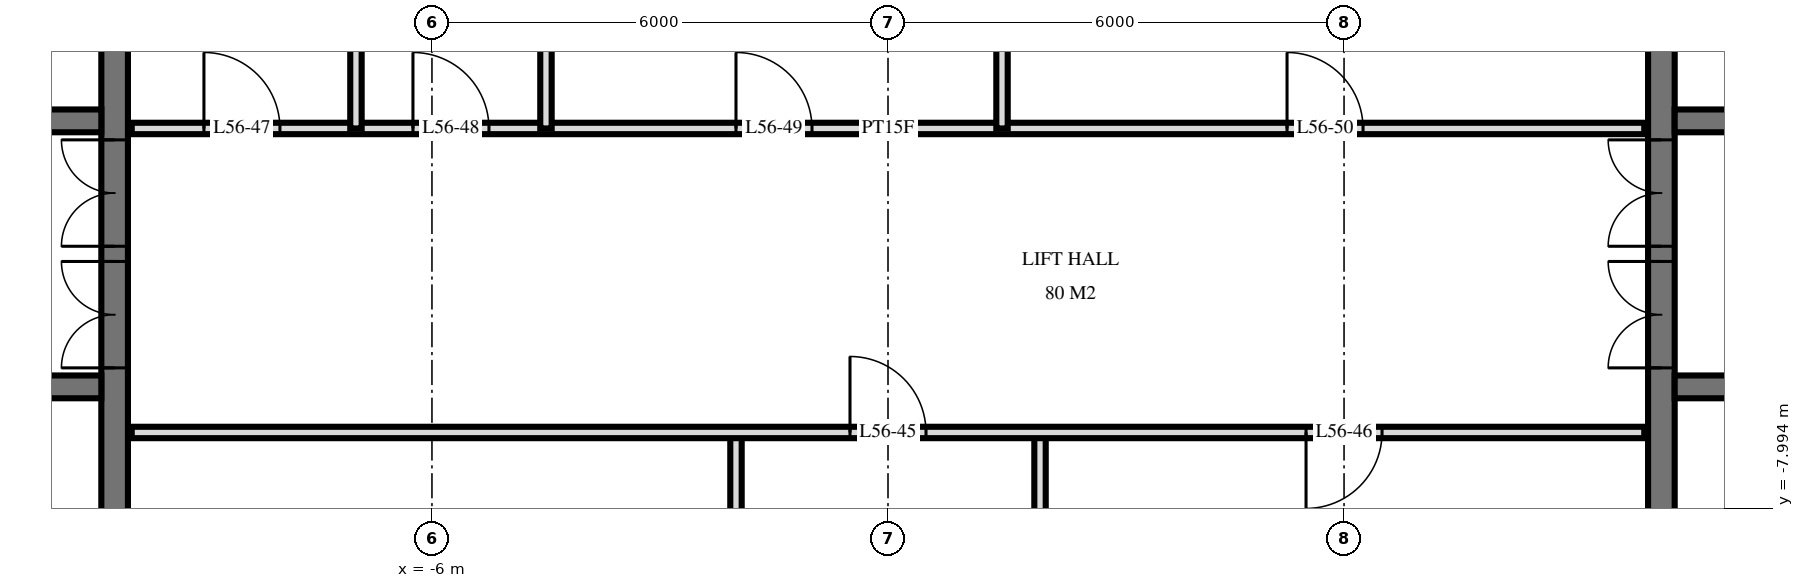
"""IFC4 building model, lengths in metres.
Left out: names, types, materials, properties, quantities, classifications, styles, units other than length and angle.
Written with IfcOpenShell. Run it as: python <this file> out.ifc"""

import sys

from ifc_helpers import new_model, si_unit, direction, frame, frame_2d, origin, place, context, subcontext, project, spatial, rectangle, extrude, element, fill, save


model = new_model("IFC4")
c1 = context("Model", 3, precision=1e-05, world=origin(), true_north=direction((0.0, 1.0)))
c2 = subcontext(c1, "Body", "Model", "MODEL_VIEW")
j1 = project(units=[si_unit("LENGTHUNIT", "METRE"), si_unit("PLANEANGLEUNIT", "RADIAN")], contexts=[c1])
p1 = place(None, origin())
s1 = spatial("IfcSite", under=j1, at=p1, CompositionType="ELEMENT")
p2 = place(p1, origin())
s2 = spatial("IfcBuilding", under=s1, at=p2, CompositionType="ELEMENT")
p3 = place(p2, frame((0.0, 0.0, 215.1)))
s3 = spatial("IfcBuildingStorey", under=s2, at=p3, CompositionType="ELEMENT", Elevation=215.1)
p4 = place(p3, frame((-10.175, -14.55, 0.0), z_axis=(0.0, 0.0, 1.0), x_axis=(0.0, 1.0, 0.0)))
e1 = element("IfcWall", 1, at=p4, inside=s3, PredefinedType="SHEAR", context=c2, shape_type="SweptSolid", body=[
    extrude(rectangle(XDim=14.1, YDim=0.35, at=frame_2d((7.05, 0.0))), origin(), (0.0, 0.0, 1.0), 3.5),
])
p5 = place(p4, frame((8.4, 0.0, 0.0)))
e2 = element("IfcOpeningElement", 2, at=p5, cuts=e1, PredefinedType="OPENING", context=c2, shape_type="SweptSolid", body=[
    extrude(rectangle(XDim=1.4, YDim=2.4, at=frame_2d((0.7, 1.2))), frame((0.0, 0.185, 0.0), z_axis=(0.0, -1.0, 0.0), x_axis=(1.0, 0.0, 0.0)), (0.0, 0.0, 1.0), 0.37),
])
p6 = place(p4, frame((10.0, 0.0, 0.0)))
e3 = element("IfcOpeningElement", 3, at=p6, cuts=e1, PredefinedType="OPENING", context=c2, shape_type="SweptSolid", body=[
    extrude(rectangle(XDim=1.4, YDim=2.4, at=frame_2d((0.7, 1.2))), frame((0.0, 0.185, 0.0), z_axis=(0.0, -1.0, 0.0), x_axis=(1.0, 0.0, 0.0)), (0.0, 0.0, 1.0), 0.37),
])
p7 = place(p4, frame((4.0, 0.0, 0.0)))
e4 = element("IfcOpeningElement", 4, at=p7, cuts=e1, PredefinedType="OPENING", context=c2, shape_type="SweptSolid", body=[
    extrude(rectangle(XDim=1.2, YDim=2.1, at=frame_2d((0.6, 1.05))), frame((0.0, 0.185, 0.0), z_axis=(0.0, -1.0, 0.0), x_axis=(1.0, 0.0, 0.0)), (0.0, 0.0, 1.0), 0.37),
])
p8 = place(p3, frame((-24.05, -2.9, 0.0), z_axis=(0.0, 0.0, 1.0), x_axis=(1.0, 0.0, 0.0)))
e5 = element("IfcWall", 5, at=p8, inside=s3, PredefinedType="SHEAR", context=c2, shape_type="SweptSolid", body=[
    extrude(rectangle(XDim=13.7, YDim=0.3, at=frame_2d((6.85, 0.0))), origin(), (0.0, 0.0, 1.0), 3.5),
])
p9 = place(p8, frame((0.55, 0.0, 0.0)))
e6 = element("IfcOpeningElement", 6, at=p9, cuts=e5, PredefinedType="OPENING", context=c2, shape_type="SweptSolid", body=[
    extrude(rectangle(XDim=1.1, YDim=2.1, at=frame_2d((0.55, 1.05))), frame((0.0, 0.16, 0.0), z_axis=(0.0, -1.0, 0.0), x_axis=(1.0, 0.0, 0.0)), (0.0, 0.0, 1.0), 0.32),
])
p10 = place(p8, frame((6.863, 0.0, 0.0)))
e7 = element("IfcOpeningElement", 7, at=p10, cuts=e5, PredefinedType="OPENING", context=c2, shape_type="SweptSolid", body=[
    extrude(rectangle(XDim=0.9, YDim=2.1, at=frame_2d((0.45, 1.05))), frame((0.0, 0.16, 0.0), z_axis=(0.0, -1.0, 0.0), x_axis=(1.0, 0.0, 0.0)), (0.0, 0.0, 1.0), 0.32),
])
p11 = place(p8, frame((5.438, 0.0, 0.0)))
e8 = element("IfcOpeningElement", 8, at=p11, cuts=e5, PredefinedType="OPENING", context=c2, shape_type="SweptSolid", body=[
    extrude(rectangle(XDim=0.9, YDim=2.1, at=frame_2d((0.45, 1.05))), frame((0.0, 0.16, 0.0), z_axis=(0.0, -1.0, 0.0), x_axis=(1.0, 0.0, 0.0)), (0.0, 0.0, 1.0), 0.32),
])
p12 = place(p8, frame((11.85, 0.0, 0.0)))
e9 = element("IfcOpeningElement", 9, at=p12, cuts=e5, PredefinedType="OPENING", context=c2, shape_type="SweptSolid", body=[
    extrude(rectangle(XDim=1.0, YDim=2.1, at=frame_2d((0.5, 1.05))), frame((0.0, 0.16, 0.0), z_axis=(0.0, -1.0, 0.0), x_axis=(1.0, 0.0, 0.0)), (0.0, 0.0, 1.0), 0.32),
])
p13 = place(p8, frame((9.562, 0.0, 0.0)))
e10 = element("IfcOpeningElement", 10, at=p13, cuts=e5, PredefinedType="OPENING", context=c2, shape_type="SweptSolid", body=[
    extrude(rectangle(XDim=1.0, YDim=2.1, at=frame_2d((0.5, 1.05))), frame((0.0, 0.16, 0.0), z_axis=(0.0, -1.0, 0.0), x_axis=(1.0, 0.0, 0.0)), (0.0, 0.0, 1.0), 0.32),
])
p14 = place(p8, frame((8.137, 0.0, 0.0)))
e11 = element("IfcOpeningElement", 11, at=p14, cuts=e5, PredefinedType="OPENING", context=c2, shape_type="SweptSolid", body=[
    extrude(rectangle(XDim=1.0, YDim=2.1, at=frame_2d((0.5, 1.05))), frame((0.0, 0.16, 0.0), z_axis=(0.0, -1.0, 0.0), x_axis=(1.0, 0.0, 0.0)), (0.0, 0.0, 1.0), 0.32),
])
p15 = place(p8, frame((3.0, 0.0, 0.0)))
e12 = element("IfcOpeningElement", 12, at=p15, cuts=e5, PredefinedType="OPENING", context=c2, shape_type="SweptSolid", body=[
    extrude(rectangle(XDim=1.0, YDim=2.1, at=frame_2d((0.5, 1.05))), frame((0.0, 0.16, 0.0), z_axis=(0.0, -1.0, 0.0), x_axis=(1.0, 0.0, 0.0)), (0.0, 0.0, 1.0), 0.32),
])
p16 = place(p3, frame((-24.05, -6.4, 0.0), z_axis=(0.0, 0.0, 1.0), x_axis=(1.0, 0.0, 0.0)))
e13 = element("IfcWall", 13, at=p16, inside=s3, PredefinedType="SHEAR", context=c2, shape_type="SweptSolid", body=[
    extrude(rectangle(XDim=13.7, YDim=0.3, at=frame_2d((6.85, 0.0))), origin(), (0.0, 0.0, 1.0), 3.5),
])
p17 = place(p16, frame((0.55, 0.0, 0.0)))
e14 = element("IfcOpeningElement", 14, at=p17, cuts=e13, PredefinedType="OPENING", context=c2, shape_type="SweptSolid", body=[
    extrude(rectangle(XDim=1.1, YDim=2.1, at=frame_2d((0.55, 1.05))), frame((0.0, 0.16, 0.0), z_axis=(0.0, -1.0, 0.0), x_axis=(1.0, 0.0, 0.0)), (0.0, 0.0, 1.0), 0.32),
])
p18 = place(p16, frame((5.8, 0.0, 0.0)))
e15 = element("IfcOpeningElement", 15, at=p18, cuts=e13, PredefinedType="OPENING", context=c2, shape_type="SweptSolid", body=[
    extrude(rectangle(XDim=1.1, YDim=2.1, at=frame_2d((0.55, 1.05))), frame((0.0, 0.16, 0.0), z_axis=(0.0, -1.0, 0.0), x_axis=(1.0, 0.0, 0.0)), (0.0, 0.0, 1.0), 0.32),
])
p19 = place(p3, frame((10.175, -14.55, 0.0), z_axis=(0.0, 0.0, 1.0), x_axis=(0.0, 1.0, 0.0)))
e16 = element("IfcWall", 16, at=p19, inside=s3, PredefinedType="SHEAR", context=c2, shape_type="SweptSolid", body=[
    extrude(rectangle(XDim=14.1, YDim=0.35, at=frame_2d((7.05, 0.0))), origin(), (0.0, 0.0, 1.0), 3.5),
])
p20 = place(p19, frame((8.4, 0.0, 0.0)))
e17 = element("IfcOpeningElement", 17, at=p20, cuts=e16, PredefinedType="OPENING", context=c2, shape_type="SweptSolid", body=[
    extrude(rectangle(XDim=1.4, YDim=2.4, at=frame_2d((0.7, 1.2))), frame((0.0, 0.185, 0.0), z_axis=(0.0, -1.0, 0.0), x_axis=(1.0, 0.0, 0.0)), (0.0, 0.0, 1.0), 0.37),
])
p21 = place(p19, frame((10.0, 0.0, 0.0)))
e18 = element("IfcOpeningElement", 18, at=p21, cuts=e16, PredefinedType="OPENING", context=c2, shape_type="SweptSolid", body=[
    extrude(rectangle(XDim=1.4, YDim=2.4, at=frame_2d((0.7, 1.2))), frame((0.0, 0.185, 0.0), z_axis=(0.0, -1.0, 0.0), x_axis=(1.0, 0.0, 0.0)), (0.0, 0.0, 1.0), 0.37),
])
p22 = place(p19, frame((4.0, 0.0, 0.0)))
e19 = element("IfcOpeningElement", 19, at=p22, cuts=e16, PredefinedType="OPENING", context=c2, shape_type="SweptSolid", body=[
    extrude(rectangle(XDim=1.2, YDim=2.1, at=frame_2d((0.6, 1.05))), frame((0.0, 0.185, 0.0), z_axis=(0.0, -1.0, 0.0), x_axis=(1.0, 0.0, 0.0)), (0.0, 0.0, 1.0), 0.37),
])
p23 = place(p3, frame((10.35, -2.9, 0.0), z_axis=(0.0, 0.0, 1.0), x_axis=(1.0, 0.0, 0.0)))
e20 = element("IfcWall", 20, at=p23, inside=s3, PredefinedType="SHEAR", context=c2, shape_type="SweptSolid", body=[
    extrude(rectangle(XDim=13.7, YDim=0.3, at=frame_2d((6.85, 0.0))), origin(), (0.0, 0.0, 1.0), 3.5),
])
p24 = place(p23, frame((12.05, 0.0, 0.0)))
e21 = element("IfcOpeningElement", 21, at=p24, cuts=e20, PredefinedType="OPENING", context=c2, shape_type="SweptSolid", body=[
    extrude(rectangle(XDim=1.1, YDim=2.1, at=frame_2d((0.55, 1.05))), frame((0.0, 0.16, 0.0), z_axis=(0.0, -1.0, 0.0), x_axis=(1.0, 0.0, 0.0)), (0.0, 0.0, 1.0), 0.32),
])
p25 = place(p23, frame((5.938, 0.0, 0.0)))
e22 = element("IfcOpeningElement", 22, at=p25, cuts=e20, PredefinedType="OPENING", context=c2, shape_type="SweptSolid", body=[
    extrude(rectangle(XDim=0.9, YDim=2.1, at=frame_2d((0.45, 1.05))), frame((0.0, 0.16, 0.0), z_axis=(0.0, -1.0, 0.0), x_axis=(1.0, 0.0, 0.0)), (0.0, 0.0, 1.0), 0.32),
])
p26 = place(p23, frame((7.363, 0.0, 0.0)))
e23 = element("IfcOpeningElement", 23, at=p26, cuts=e20, PredefinedType="OPENING", context=c2, shape_type="SweptSolid", body=[
    extrude(rectangle(XDim=0.9, YDim=2.1, at=frame_2d((0.45, 1.05))), frame((0.0, 0.16, 0.0), z_axis=(0.0, -1.0, 0.0), x_axis=(1.0, 0.0, 0.0)), (0.0, 0.0, 1.0), 0.32),
])
p27 = place(p23, frame((0.85, 0.0, 0.0)))
e24 = element("IfcOpeningElement", 24, at=p27, cuts=e20, PredefinedType="OPENING", context=c2, shape_type="SweptSolid", body=[
    extrude(rectangle(XDim=1.0, YDim=2.1, at=frame_2d((0.5, 1.05))), frame((0.0, 0.16, 0.0), z_axis=(0.0, -1.0, 0.0), x_axis=(1.0, 0.0, 0.0)), (0.0, 0.0, 1.0), 0.32),
])
p28 = place(p23, frame((3.137, 0.0, 0.0)))
e25 = element("IfcOpeningElement", 25, at=p28, cuts=e20, PredefinedType="OPENING", context=c2, shape_type="SweptSolid", body=[
    extrude(rectangle(XDim=1.0, YDim=2.1, at=frame_2d((0.5, 1.05))), frame((0.0, 0.16, 0.0), z_axis=(0.0, -1.0, 0.0), x_axis=(1.0, 0.0, 0.0)), (0.0, 0.0, 1.0), 0.32),
])
p29 = place(p23, frame((4.562, 0.0, 0.0)))
e26 = element("IfcOpeningElement", 26, at=p29, cuts=e20, PredefinedType="OPENING", context=c2, shape_type="SweptSolid", body=[
    extrude(rectangle(XDim=1.0, YDim=2.1, at=frame_2d((0.5, 1.05))), frame((0.0, 0.16, 0.0), z_axis=(0.0, -1.0, 0.0), x_axis=(1.0, 0.0, 0.0)), (0.0, 0.0, 1.0), 0.32),
])
p30 = place(p23, frame((9.7, 0.0, 0.0)))
e27 = element("IfcOpeningElement", 27, at=p30, cuts=e20, PredefinedType="OPENING", context=c2, shape_type="SweptSolid", body=[
    extrude(rectangle(XDim=1.0, YDim=2.1, at=frame_2d((0.5, 1.05))), frame((0.0, 0.16, 0.0), z_axis=(0.0, -1.0, 0.0), x_axis=(1.0, 0.0, 0.0)), (0.0, 0.0, 1.0), 0.32),
])
p31 = place(p3, frame((10.35, -6.4, 0.0), z_axis=(0.0, 0.0, 1.0), x_axis=(1.0, 0.0, 0.0)))
e28 = element("IfcWall", 28, at=p31, inside=s3, PredefinedType="SHEAR", context=c2, shape_type="SweptSolid", body=[
    extrude(rectangle(XDim=13.7, YDim=0.3, at=frame_2d((6.85, 0.0))), origin(), (0.0, 0.0, 1.0), 3.5),
])
p32 = place(p31, frame((12.05, 0.0, 0.0)))
e29 = element("IfcOpeningElement", 29, at=p32, cuts=e28, PredefinedType="OPENING", context=c2, shape_type="SweptSolid", body=[
    extrude(rectangle(XDim=1.1, YDim=2.1, at=frame_2d((0.55, 1.05))), frame((0.0, 0.16, 0.0), z_axis=(0.0, -1.0, 0.0), x_axis=(1.0, 0.0, 0.0)), (0.0, 0.0, 1.0), 0.32),
])
p33 = place(p31, frame((6.8, 0.0, 0.0)))
e30 = element("IfcOpeningElement", 30, at=p33, cuts=e28, PredefinedType="OPENING", context=c2, shape_type="SweptSolid", body=[
    extrude(rectangle(XDim=1.1, YDim=2.1, at=frame_2d((0.55, 1.05))), frame((0.0, 0.16, 0.0), z_axis=(0.0, -1.0, 0.0), x_axis=(1.0, 0.0, 0.0)), (0.0, 0.0, 1.0), 0.32),
])
p34 = place(p3, frame((2.0, -11.0, 0.0), z_axis=(0.0, 0.0, 1.0), x_axis=(0.0, 1.0, 0.0)))
e31 = element("IfcWall", 31, at=p34, inside=s3, PredefinedType="PARTITIONING", context=c2, shape_type="SweptSolid", body=[
    extrude(rectangle(XDim=4.0, YDim=0.15, at=frame_2d((2.0, 0.0))), origin(), (0.0, 0.0, 1.0), 3.22),
])
p35 = place(p3, frame((1.5, -3.0, 0.0), z_axis=(0.0, 0.0, 1.0), x_axis=(0.0, 1.0, 0.0)))
e32 = element("IfcWall", 32, at=p35, inside=s3, PredefinedType="PARTITIONING", context=c2, shape_type="SweptSolid", body=[
    extrude(rectangle(XDim=4.02, YDim=0.15, at=frame_2d((2.01, 0.0))), origin(), (0.0, 0.0, 1.0), 3.22),
])
p36 = place(p3, frame((-2.0, -11.0, 0.0), z_axis=(0.0, 0.0, 1.0), x_axis=(0.0, 1.0, 0.0)))
e33 = element("IfcWall", 33, at=p36, inside=s3, PredefinedType="PARTITIONING", context=c2, shape_type="SweptSolid", body=[
    extrude(rectangle(XDim=4.0, YDim=0.15, at=frame_2d((2.0, 0.0))), origin(), (0.0, 0.0, 1.0), 3.22),
])
for number, where, z_axis, x_axis in (
    (34, (-4.5, -3.0, 0.0), (0.0, 0.0, 1.0), (0.0, 1.0, 0.0)),
    (35, (-7.0, -3.0, 0.0), (0.0, 0.0, 1.0), (0.0, 1.0, 0.0)),
):
    element("IfcWall", number, at=place(p3, frame(where, z_axis=z_axis, x_axis=x_axis)), inside=s3, PredefinedType="PLUMBINGWALL", context=c2, shape_type="SweptSolid", body=[
        extrude(rectangle(XDim=4.02, YDim=0.15, at=frame_2d((2.01, 0.0))), origin(), (0.0, 0.0, 1.0), 3.22),
    ])
p37 = place(p3, frame((-9.95, -7.0, 0.0), z_axis=(0.0, 0.0, 1.0), x_axis=(1.0, 0.0, 0.0)))
e36 = element("IfcWall", 36, at=p37, inside=s3, PredefinedType="PARTITIONING", context=c2, shape_type="SweptSolid", body=[
    extrude(rectangle(XDim=19.9, YDim=0.15, at=frame_2d((9.95, 0.0))), origin(), (0.0, 0.0, 1.0), 3.22),
])
p38 = place(p37, frame((9.45, 0.0, 0.0)))
e37 = element("IfcOpeningElement", 37, at=p38, cuts=e36, PredefinedType="OPENING", context=c2, shape_type="SweptSolid", body=[
    extrude(rectangle(XDim=1.0, YDim=2.1, at=frame_2d((0.5, 1.05))), frame((0.0, 0.085, 0.0), z_axis=(0.0, -1.0, 0.0), x_axis=(1.0, 0.0, 0.0)), (0.0, 0.0, 1.0), 0.17),
])
p39 = place(p37, frame((15.45, 0.0, 0.0)))
e38 = element("IfcOpeningElement", 38, at=p39, cuts=e36, PredefinedType="OPENING", context=c2, shape_type="SweptSolid", body=[
    extrude(rectangle(XDim=1.0, YDim=2.1, at=frame_2d((0.5, 1.05))), frame((0.0, 0.085, 0.0), z_axis=(0.0, -1.0, 0.0), x_axis=(1.0, 0.0, 0.0)), (0.0, 0.0, 1.0), 0.17),
])
p40 = place(p3, frame((-9.95, -3.0, 0.0), z_axis=(0.0, 0.0, 1.0), x_axis=(1.0, 0.0, 0.0)))
e39 = element("IfcWall", 39, at=p40, inside=s3, PredefinedType="PARTITIONING", context=c2, shape_type="SweptSolid", body=[
    extrude(rectangle(XDim=19.9, YDim=0.15, at=frame_2d((9.95, 0.0))), origin(), (0.0, 0.0, 1.0), 3.22),
])
p41 = place(p40, frame((0.95, 0.0, 0.0)))
e40 = element("IfcOpeningElement", 40, at=p41, cuts=e39, PredefinedType="OPENING", context=c2, shape_type="SweptSolid", body=[
    extrude(rectangle(XDim=1.0, YDim=2.1, at=frame_2d((0.5, 1.05))), frame((0.0, 0.085, 0.0), z_axis=(0.0, -1.0, 0.0), x_axis=(1.0, 0.0, 0.0)), (0.0, 0.0, 1.0), 0.17),
])
p42 = place(p40, frame((3.7, 0.0, 0.0)))
e41 = element("IfcOpeningElement", 41, at=p42, cuts=e39, PredefinedType="OPENING", context=c2, shape_type="SweptSolid", body=[
    extrude(rectangle(XDim=1.0, YDim=2.1, at=frame_2d((0.5, 1.05))), frame((0.0, 0.085, 0.0), z_axis=(0.0, -1.0, 0.0), x_axis=(1.0, 0.0, 0.0)), (0.0, 0.0, 1.0), 0.17),
])
p43 = place(p40, frame((7.95, 0.0, 0.0)))
e42 = element("IfcOpeningElement", 42, at=p43, cuts=e39, PredefinedType="OPENING", context=c2, shape_type="SweptSolid", body=[
    extrude(rectangle(XDim=1.0, YDim=2.1, at=frame_2d((0.5, 1.05))), frame((0.0, 0.085, 0.0), z_axis=(0.0, -1.0, 0.0), x_axis=(1.0, 0.0, 0.0)), (0.0, 0.0, 1.0), 0.17),
])
p44 = place(p40, frame((15.2, 0.0, 0.0)))
e43 = element("IfcOpeningElement", 43, at=p44, cuts=e39, PredefinedType="OPENING", context=c2, shape_type="SweptSolid", body=[
    extrude(rectangle(XDim=1.0, YDim=2.1, at=frame_2d((0.5, 1.05))), frame((0.0, 0.085, 0.0), z_axis=(0.0, -1.0, 0.0), x_axis=(1.0, 0.0, 0.0)), (0.0, 0.0, 1.0), 0.17),
])
p45 = place(p5, origin())
e44 = element("IfcDoor", 44, at=p45, inside=s3, OperationType="DOUBLE_DOOR_SINGLE_SWING", PredefinedType="DOOR", context=c2, shape_type="SweptSolid", body=[
    extrude(rectangle(XDim=1.4, YDim=2.4, at=frame_2d((0.7, 1.2))), frame((0.0, 0.025, 0.0), z_axis=(0.0, -1.0, 0.0), x_axis=(1.0, 0.0, 0.0)), (0.0, 0.0, 1.0), 0.05),
])
fill(e2, e44)
p46 = place(p6, origin())
e45 = element("IfcDoor", 45, at=p46, inside=s3, OperationType="DOUBLE_DOOR_SINGLE_SWING", PredefinedType="DOOR", context=c2, shape_type="SweptSolid", body=[
    extrude(rectangle(XDim=1.4, YDim=2.4, at=frame_2d((0.7, 1.2))), frame((0.0, 0.025, 0.0), z_axis=(0.0, -1.0, 0.0), x_axis=(1.0, 0.0, 0.0)), (0.0, 0.0, 1.0), 0.05),
])
fill(e3, e45)
p47 = place(p20, origin())
e46 = element("IfcDoor", 46, at=p47, inside=s3, OperationType="DOUBLE_DOOR_SINGLE_SWING", PredefinedType="DOOR", context=c2, shape_type="SweptSolid", body=[
    extrude(rectangle(XDim=1.4, YDim=2.4, at=frame_2d((0.7, 1.2))), frame((0.0, 0.025, 0.0), z_axis=(0.0, -1.0, 0.0), x_axis=(1.0, 0.0, 0.0)), (0.0, 0.0, 1.0), 0.05),
])
fill(e17, e46)
p48 = place(p21, origin())
e47 = element("IfcDoor", 47, at=p48, inside=s3, OperationType="DOUBLE_DOOR_SINGLE_SWING", PredefinedType="DOOR", context=c2, shape_type="SweptSolid", body=[
    extrude(rectangle(XDim=1.4, YDim=2.4, at=frame_2d((0.7, 1.2))), frame((0.0, 0.025, 0.0), z_axis=(0.0, -1.0, 0.0), x_axis=(1.0, 0.0, 0.0)), (0.0, 0.0, 1.0), 0.05),
])
fill(e18, e47)
p49 = place(p38, origin())
e48 = element("IfcDoor", 48, at=p49, inside=s3, OperationType="SINGLE_SWING_RIGHT", PredefinedType="DOOR", context=c2, shape_type="SweptSolid", body=[
    extrude(rectangle(XDim=1.0, YDim=2.1, at=frame_2d((0.5, 1.05))), frame((0.0, 0.025, 0.0), z_axis=(0.0, -1.0, 0.0), x_axis=(1.0, 0.0, 0.0)), (0.0, 0.0, 1.0), 0.05),
])
fill(e37, e48)
p50 = place(p39, frame((0.5, 0.0, 0.0), z_axis=(0.0, 0.0, 1.0), x_axis=(-1.0, 0.0, 0.0)))
e49 = element("IfcDoor", 49, at=p50, inside=s3, OperationType="SINGLE_SWING_LEFT", PredefinedType="DOOR", context=c2, shape_type="SweptSolid", body=[
    extrude(rectangle(XDim=1.0, YDim=2.1, at=frame_2d((0.0, 1.05))), frame((0.0, -0.025, 0.0), z_axis=(0.0, 1.0, 0.0), x_axis=(-1.0, 0.0, 0.0)), (0.0, 0.0, 1.0), 0.05),
])
fill(e38, e49)
p51 = place(p41, origin())
e50 = element("IfcDoor", 50, at=p51, inside=s3, OperationType="SINGLE_SWING_RIGHT", PredefinedType="DOOR", context=c2, shape_type="SweptSolid", body=[
    extrude(rectangle(XDim=1.0, YDim=2.1, at=frame_2d((0.5, 1.05))), frame((0.0, 0.025, 0.0), z_axis=(0.0, -1.0, 0.0), x_axis=(1.0, 0.0, 0.0)), (0.0, 0.0, 1.0), 0.05),
])
fill(e40, e50)
p52 = place(p42, origin())
e51 = element("IfcDoor", 51, at=p52, inside=s3, OperationType="SINGLE_SWING_RIGHT", PredefinedType="DOOR", context=c2, shape_type="SweptSolid", body=[
    extrude(rectangle(XDim=1.0, YDim=2.1, at=frame_2d((0.5, 1.05))), frame((0.0, 0.025, 0.0), z_axis=(0.0, -1.0, 0.0), x_axis=(1.0, 0.0, 0.0)), (0.0, 0.0, 1.0), 0.05),
])
fill(e41, e51)
p53 = place(p43, origin())
e52 = element("IfcDoor", 52, at=p53, inside=s3, OperationType="SINGLE_SWING_RIGHT", PredefinedType="DOOR", context=c2, shape_type="SweptSolid", body=[
    extrude(rectangle(XDim=1.0, YDim=2.1, at=frame_2d((0.5, 1.05))), frame((0.0, 0.025, 0.0), z_axis=(0.0, -1.0, 0.0), x_axis=(1.0, 0.0, 0.0)), (0.0, 0.0, 1.0), 0.05),
])
fill(e42, e52)
p54 = place(p44, origin())
e53 = element("IfcDoor", 53, at=p54, inside=s3, OperationType="SINGLE_SWING_RIGHT", PredefinedType="DOOR", context=c2, shape_type="SweptSolid", body=[
    extrude(rectangle(XDim=1.0, YDim=2.1, at=frame_2d((0.5, 1.05))), frame((0.0, 0.025, 0.0), z_axis=(0.0, -1.0, 0.0), x_axis=(1.0, 0.0, 0.0)), (0.0, 0.0, 1.0), 0.05),
])
fill(e43, e53)
save(model, sys.argv[1])
